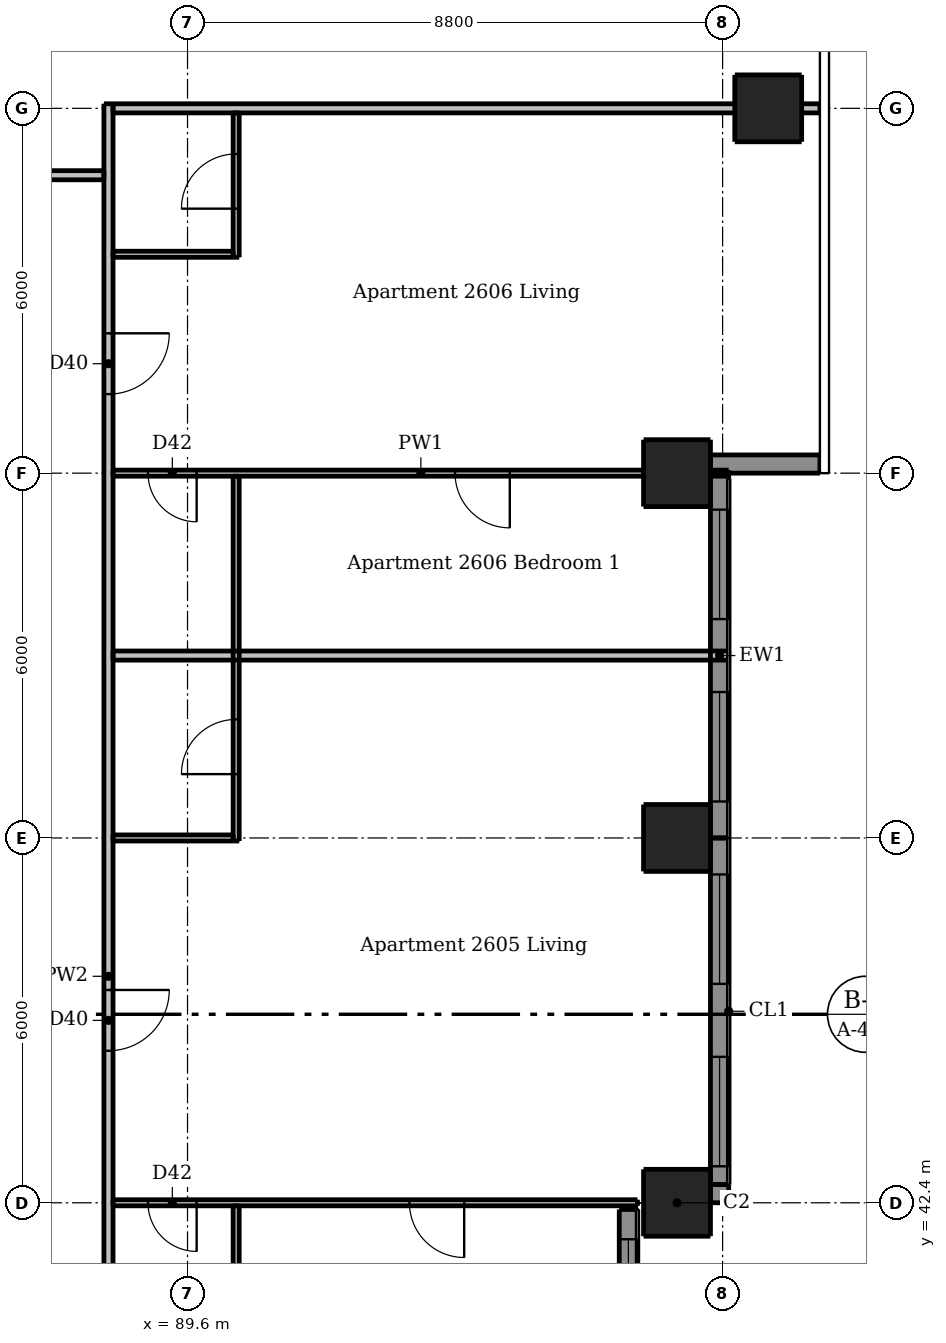
"""IFC4 building model, lengths in metres.
Left out: names, types, materials, properties, quantities, classifications, styles, units other than length and angle.
Written with IfcOpenShell. Run it as: python <this file> out.ifc"""

import sys

from ifc_helpers import new_model, si_unit, direction, frame, frame_2d, origin, origin_2d, place, context, subcontext, project, spatial, rectangle, extrude, element, fill, save


model = new_model("IFC4")
c1 = context("Model", 3, precision=1e-05, world=origin(), true_north=direction((0.0, 1.0)))
c2 = subcontext(c1, "Body", "Model", "MODEL_VIEW")
j1 = project(units=[si_unit("LENGTHUNIT", "METRE"), si_unit("PLANEANGLEUNIT", "RADIAN")], contexts=[c1])
p1 = place(None, origin())
s1 = spatial("IfcSite", under=j1, at=p1, CompositionType="ELEMENT")
p2 = place(p1, origin())
s2 = spatial("IfcBuilding", under=s1, at=p2, CompositionType="ELEMENT")
p3 = place(p2, frame((0.0, 0.0, 98.5)))
s3 = spatial("IfcBuildingStorey", under=s2, at=p3, CompositionType="ELEMENT", Elevation=98.5)
for number, where, z_axis, x_axis in (
    (1, (97.65, 42.4, 0.0), (0.0, 0.0, 1.0), (1.0, 0.0, 0.0)),
    (2, (97.65, 48.4, 0.0), (0.0, 0.0, 1.0), (1.0, 0.0, 0.0)),
    (3, (97.65, 54.4, 0.0), (0.0, 0.0, 1.0), (1.0, 0.0, 0.0)),
    (4, (99.15, 60.4, 0.0), (0.0, 0.0, 1.0), (1.0, 0.0, 0.0)),
):
    element("IfcColumn", number, at=place(p3, frame(where, z_axis=z_axis, x_axis=x_axis)), inside=s3, PredefinedType="COLUMN", context=c2, shape_type="SweptSolid", body=[
        extrude(rectangle(XDim=1.1, YDim=1.1, at=origin_2d()), origin(), (0.0, 0.0, 1.0), 3.05),
    ])
p4 = place(p3, frame((98.2, 42.55, 0.0), z_axis=(0.0, 0.0, 1.0), x_axis=(1.0, 0.0, 0.0)))
e5 = element("IfcWall", 5, at=p4, inside=s3, PredefinedType="SOLIDWALL", context=c2, shape_type="SweptSolid", body=[
    extrude(rectangle(XDim=0.3, YDim=0.3, at=frame_2d((0.15, 0.0))), origin(), (0.0, 0.0, 1.0), 3.05),
])
p5 = place(p3, frame((98.2, 54.55, 0.0), z_axis=(0.0, 0.0, 1.0), x_axis=(1.0, 0.0, 0.0)))
e6 = element("IfcWall", 6, at=p5, inside=s3, PredefinedType="SOLIDWALL", context=c2, shape_type="SweptSolid", body=[
    extrude(rectangle(XDim=1.8, YDim=0.3, at=frame_2d((0.9, 0.0))), origin(), (0.0, 0.0, 1.0), 3.05),
])
p6 = place(p3, frame((96.85, 36.7, 0.0), z_axis=(0.0, 0.0, 1.0), x_axis=(0.0, 1.0, 0.0)))
e7 = element("IfcWall", 7, at=p6, inside=s3, PredefinedType="SOLIDWALL", context=c2, shape_type="SweptSolid", body=[
    extrude(rectangle(XDim=5.59, YDim=0.3, at=frame_2d((2.795, 0.0))), origin(), (0.0, 0.0, 1.0), 3.05),
])
p7 = place(p6, frame((0.3, 0.0, 0.15)))
e8 = element("IfcOpeningElement", 8, at=p7, cuts=e7, PredefinedType="OPENING", context=c2, shape_type="SweptSolid", body=[
    extrude(rectangle(XDim=1.8, YDim=2.1, at=frame_2d((0.9, 1.05))), frame((0.0, 0.16, 0.0), z_axis=(0.0, -1.0, 0.0), x_axis=(1.0, 0.0, 0.0)), (0.0, 0.0, 1.0), 0.32),
])
p8 = place(p6, frame((3.3, 0.0, 0.15)))
e9 = element("IfcOpeningElement", 9, at=p8, cuts=e7, PredefinedType="OPENING", context=c2, shape_type="SweptSolid", body=[
    extrude(rectangle(XDim=1.8, YDim=2.1, at=frame_2d((0.9, 1.05))), frame((0.0, 0.16, 0.0), z_axis=(0.0, -1.0, 0.0), x_axis=(1.0, 0.0, 0.0)), (0.0, 0.0, 1.0), 0.32),
])
p9 = place(p3, frame((98.35, 42.7, 0.0), z_axis=(0.0, 0.0, 1.0), x_axis=(0.0, 1.0, 0.0)))
e10 = element("IfcWall", 10, at=p9, inside=s3, PredefinedType="SOLIDWALL", context=c2, shape_type="SweptSolid", body=[
    extrude(rectangle(XDim=5.7, YDim=0.3, at=frame_2d((2.85, 0.0))), origin(), (0.0, 0.0, 1.0), 3.05),
])
p10 = place(p9, frame((0.3, 0.0, 0.15)))
e11 = element("IfcOpeningElement", 11, at=p10, cuts=e10, PredefinedType="OPENING", context=c2, shape_type="SweptSolid", body=[
    extrude(rectangle(XDim=1.8, YDim=2.1, at=frame_2d((0.9, 1.05))), frame((0.0, 0.16, 0.0), z_axis=(0.0, -1.0, 0.0), x_axis=(1.0, 0.0, 0.0)), (0.0, 0.0, 1.0), 0.32),
])
p11 = place(p9, frame((3.3, 0.0, 0.15)))
e12 = element("IfcOpeningElement", 12, at=p11, cuts=e10, PredefinedType="OPENING", context=c2, shape_type="SweptSolid", body=[
    extrude(rectangle(XDim=1.8, YDim=2.1, at=frame_2d((0.9, 1.05))), frame((0.0, 0.16, 0.0), z_axis=(0.0, -1.0, 0.0), x_axis=(1.0, 0.0, 0.0)), (0.0, 0.0, 1.0), 0.32),
])
p12 = place(p3, frame((98.35, 48.4, 0.0), z_axis=(0.0, 0.0, 1.0), x_axis=(0.0, 1.0, 0.0)))
e13 = element("IfcWall", 13, at=p12, inside=s3, PredefinedType="SOLIDWALL", context=c2, shape_type="SweptSolid", body=[
    extrude(rectangle(XDim=6.0, YDim=0.3, at=frame_2d((3.0, 0.0))), origin(), (0.0, 0.0, 1.0), 3.05),
])
p13 = place(p12, frame((0.6, 0.0, 0.15)))
e14 = element("IfcOpeningElement", 14, at=p13, cuts=e13, PredefinedType="OPENING", context=c2, shape_type="SweptSolid", body=[
    extrude(rectangle(XDim=1.8, YDim=2.1, at=frame_2d((0.9, 1.05))), frame((0.0, 0.16, 0.0), z_axis=(0.0, -1.0, 0.0), x_axis=(1.0, 0.0, 0.0)), (0.0, 0.0, 1.0), 0.32),
])
p14 = place(p12, frame((3.6, 0.0, 0.15)))
e15 = element("IfcOpeningElement", 15, at=p14, cuts=e13, PredefinedType="OPENING", context=c2, shape_type="SweptSolid", body=[
    extrude(rectangle(XDim=1.8, YDim=2.1, at=frame_2d((0.9, 1.05))), frame((0.0, 0.16, 0.0), z_axis=(0.0, -1.0, 0.0), x_axis=(1.0, 0.0, 0.0)), (0.0, 0.0, 1.0), 0.32),
])
p15 = place(p3, frame((90.4, 33.45, 0.0), z_axis=(0.0, 0.0, 1.0), x_axis=(0.0, 1.0, 0.0)))
e16 = element("IfcWall", 16, at=p15, inside=s3, PredefinedType="PARTITIONING", context=c2, shape_type="SweptSolid", body=[
    extrude(rectangle(XDim=8.9, YDim=0.1, at=frame_2d((4.45, 0.0))), origin(), (0.0, 0.0, 1.0), 3.05),
])
p16 = place(p15, frame((3.75, 0.0, 0.0)))
e17 = element("IfcOpeningElement", 17, at=p16, cuts=e16, PredefinedType="OPENING", context=c2, shape_type="SweptSolid", body=[
    extrude(rectangle(XDim=0.8, YDim=2.1, at=frame_2d((0.4, 1.05))), frame((0.0, 0.06, 0.0), z_axis=(0.0, -1.0, 0.0), x_axis=(1.0, 0.0, 0.0)), (0.0, 0.0, 1.0), 0.12),
])
p17 = place(p3, frame((90.4, 48.35, 0.0), z_axis=(0.0, 0.0, 1.0), x_axis=(0.0, 1.0, 0.0)))
e18 = element("IfcWall", 18, at=p17, inside=s3, PredefinedType="PARTITIONING", context=c2, shape_type="SweptSolid", body=[
    extrude(rectangle(XDim=6.0, YDim=0.1, at=frame_2d((3.0, 0.0))), origin(), (0.0, 0.0, 1.0), 3.05),
])
p18 = place(p17, frame((1.1, 0.0, 0.0)))
e19 = element("IfcOpeningElement", 19, at=p18, cuts=e18, PredefinedType="OPENING", context=c2, shape_type="SweptSolid", body=[
    extrude(rectangle(XDim=0.9, YDim=2.1, at=frame_2d((0.45, 1.05))), frame((0.0, 0.06, 0.0), z_axis=(0.0, -1.0, 0.0), x_axis=(1.0, 0.0, 0.0)), (0.0, 0.0, 1.0), 0.12),
])
p19 = place(p3, frame((90.4, 57.95, 0.0), z_axis=(0.0, 0.0, 1.0), x_axis=(0.0, 1.0, 0.0)))
e20 = element("IfcWall", 20, at=p19, inside=s3, PredefinedType="PARTITIONING", context=c2, shape_type="SweptSolid", body=[
    extrude(rectangle(XDim=2.375, YDim=0.1, at=frame_2d((1.188, 0.0))), origin(), (0.0, 0.0, 1.0), 3.05),
])
p20 = place(p19, frame((0.8, 0.0, 0.0)))
e21 = element("IfcOpeningElement", 21, at=p20, cuts=e20, PredefinedType="OPENING", context=c2, shape_type="SweptSolid", body=[
    extrude(rectangle(XDim=0.9, YDim=2.1, at=frame_2d((0.45, 1.05))), frame((0.0, 0.06, 0.0), z_axis=(0.0, -1.0, 0.0), x_axis=(1.0, 0.0, 0.0)), (0.0, 0.0, 1.0), 0.12),
])
p21 = place(p3, frame((88.375, 58.0, 0.0), z_axis=(0.0, 0.0, 1.0), x_axis=(1.0, 0.0, 0.0)))
e22 = element("IfcWall", 22, at=p21, inside=s3, PredefinedType="PARTITIONING", context=c2, shape_type="SweptSolid", body=[
    extrude(rectangle(XDim=1.975, YDim=0.1, at=frame_2d((0.988, 0.0))), origin(), (0.0, 0.0, 1.0), 3.05),
])
p22 = place(p3, frame((98.5, 54.4, 0.0), z_axis=(0.0, 0.0, 1.0), x_axis=(-1.0, 0.0, 0.0)))
e23 = element("IfcWall", 23, at=p22, inside=s3, PredefinedType="PARTITIONING", context=c2, shape_type="SweptSolid", body=[
    extrude(rectangle(XDim=10.125, YDim=0.1, at=frame_2d((5.062, 0.0))), origin(), (0.0, 0.0, 1.0), 2.516),
])
p23 = place(p22, frame((3.6, 0.0, 0.0)))
e24 = element("IfcOpeningElement", 24, at=p23, cuts=e23, PredefinedType="OPENING", context=c2, shape_type="SweptSolid", body=[
    extrude(rectangle(XDim=0.9, YDim=2.1, at=frame_2d((0.45, 1.05))), frame((0.0, 0.06, 0.0), z_axis=(0.0, -1.0, 0.0), x_axis=(1.0, 0.0, 0.0)), (0.0, 0.0, 1.0), 0.12),
])
p24 = place(p22, frame((8.75, 0.0, 0.0)))
e25 = element("IfcOpeningElement", 25, at=p24, cuts=e23, PredefinedType="OPENING", context=c2, shape_type="SweptSolid", body=[
    extrude(rectangle(XDim=0.8, YDim=2.1, at=frame_2d((0.4, 1.05))), frame((0.0, 0.06, 0.0), z_axis=(0.0, -1.0, 0.0), x_axis=(1.0, 0.0, 0.0)), (0.0, 0.0, 1.0), 0.12),
])
p25 = place(p3, frame((88.375, 48.4, 0.0), z_axis=(0.0, 0.0, 1.0), x_axis=(1.0, 0.0, 0.0)))
e26 = element("IfcWall", 26, at=p25, inside=s3, PredefinedType="PARTITIONING", context=c2, shape_type="SweptSolid", body=[
    extrude(rectangle(XDim=1.975, YDim=0.1, at=frame_2d((0.988, 0.0))), origin(), (0.0, 0.0, 1.0), 2.516),
])
p26 = place(p3, frame((97.0, 42.4, 0.0), z_axis=(0.0, 0.0, 1.0), x_axis=(-1.0, 0.0, 0.0)))
e27 = element("IfcWall", 27, at=p26, inside=s3, PredefinedType="PARTITIONING", context=c2, shape_type="SweptSolid", body=[
    extrude(rectangle(XDim=8.625, YDim=0.1, at=frame_2d((4.312, 0.0))), origin(), (0.0, 0.0, 1.0), 2.516),
])
p27 = place(p26, frame((2.85, 0.0, 0.0)))
e28 = element("IfcOpeningElement", 28, at=p27, cuts=e27, PredefinedType="OPENING", context=c2, shape_type="SweptSolid", body=[
    extrude(rectangle(XDim=0.9, YDim=2.1, at=frame_2d((0.45, 1.05))), frame((0.0, 0.06, 0.0), z_axis=(0.0, -1.0, 0.0), x_axis=(1.0, 0.0, 0.0)), (0.0, 0.0, 1.0), 0.12),
])
p28 = place(p26, frame((7.25, 0.0, 0.0)))
e29 = element("IfcOpeningElement", 29, at=p28, cuts=e27, PredefinedType="OPENING", context=c2, shape_type="SweptSolid", body=[
    extrude(rectangle(XDim=0.8, YDim=2.1, at=frame_2d((0.4, 1.05))), frame((0.0, 0.06, 0.0), z_axis=(0.0, -1.0, 0.0), x_axis=(1.0, 0.0, 0.0)), (0.0, 0.0, 1.0), 0.12),
])
p29 = place(p3, frame((88.3, 60.475, 0.0), z_axis=(0.0, 0.0, 1.0), x_axis=(0.0, -1.0, 0.0)))
e30 = element("IfcWall", 30, at=p29, inside=s3, PredefinedType="PARTITIONING", context=c2, shape_type="SweptSolid", body=[
    extrude(rectangle(XDim=28.7, YDim=0.15, at=frame_2d((14.35, 0.0))), origin(), (0.0, 0.0, 1.0), 3.05),
])
p30 = place(p29, frame((27.425, 0.0, 0.0)))
e31 = element("IfcOpeningElement", 31, at=p30, cuts=e30, PredefinedType="OPENING", context=c2, shape_type="SweptSolid", body=[
    extrude(rectangle(XDim=1.0, YDim=2.1, at=frame_2d((0.5, 1.05))), frame((0.0, 0.085, 0.0), z_axis=(0.0, -1.0, 0.0), x_axis=(1.0, 0.0, 0.0)), (0.0, 0.0, 1.0), 0.17),
])
p31 = place(p29, frame((14.575, 0.0, 0.0)))
e32 = element("IfcOpeningElement", 32, at=p31, cuts=e30, PredefinedType="OPENING", context=c2, shape_type="SweptSolid", body=[
    extrude(rectangle(XDim=1.0, YDim=2.1, at=frame_2d((0.5, 1.05))), frame((0.0, 0.085, 0.0), z_axis=(0.0, -1.0, 0.0), x_axis=(1.0, 0.0, 0.0)), (0.0, 0.0, 1.0), 0.17),
])
p32 = place(p29, frame((3.775, 0.0, 0.0)))
e33 = element("IfcOpeningElement", 33, at=p32, cuts=e30, PredefinedType="OPENING", context=c2, shape_type="SweptSolid", body=[
    extrude(rectangle(XDim=1.0, YDim=2.1, at=frame_2d((0.5, 1.05))), frame((0.0, 0.085, 0.0), z_axis=(0.0, -1.0, 0.0), x_axis=(1.0, 0.0, 0.0)), (0.0, 0.0, 1.0), 0.17),
])
p33 = place(p3, frame((88.375, 60.4, 0.0), z_axis=(0.0, 0.0, 1.0), x_axis=(1.0, 0.0, 0.0)))
e34 = element("IfcWall", 34, at=p33, inside=s3, PredefinedType="PARTITIONING", context=c2, shape_type="SweptSolid", body=[
    extrude(rectangle(XDim=11.625, YDim=0.15, at=frame_2d((5.812, 0.0))), origin(), (0.0, 0.0, 1.0), 2.516),
])
p34 = place(p3, frame((59.675, 59.3, 0.0), z_axis=(0.0, 0.0, 1.0), x_axis=(1.0, 0.0, 0.0)))
e35 = element("IfcWall", 35, at=p34, inside=s3, PredefinedType="PARTITIONING", context=c2, shape_type="SweptSolid", body=[
    extrude(rectangle(XDim=28.55, YDim=0.15, at=frame_2d((14.275, 0.0))), origin(), (0.0, 0.0, 1.0), 3.05),
])
p35 = place(p34, frame((3.625, 0.0, 0.0)))
e36 = element("IfcOpeningElement", 36, at=p35, cuts=e35, PredefinedType="OPENING", context=c2, shape_type="SweptSolid", body=[
    extrude(rectangle(XDim=1.0, YDim=2.1, at=frame_2d((0.5, 1.05))), frame((0.0, 0.085, 0.0), z_axis=(0.0, -1.0, 0.0), x_axis=(1.0, 0.0, 0.0)), (0.0, 0.0, 1.0), 0.17),
])
p36 = place(p34, frame((14.425, 0.0, 0.0)))
e37 = element("IfcOpeningElement", 37, at=p36, cuts=e35, PredefinedType="OPENING", context=c2, shape_type="SweptSolid", body=[
    extrude(rectangle(XDim=1.0, YDim=2.1, at=frame_2d((0.5, 1.05))), frame((0.0, 0.085, 0.0), z_axis=(0.0, -1.0, 0.0), x_axis=(1.0, 0.0, 0.0)), (0.0, 0.0, 1.0), 0.17),
])
p37 = place(p34, frame((25.775, 0.0, 0.0)))
e38 = element("IfcOpeningElement", 38, at=p37, cuts=e35, PredefinedType="OPENING", context=c2, shape_type="SweptSolid", body=[
    extrude(rectangle(XDim=1.0, YDim=2.1, at=frame_2d((0.5, 1.05))), frame((0.0, 0.085, 0.0), z_axis=(0.0, -1.0, 0.0), x_axis=(1.0, 0.0, 0.0)), (0.0, 0.0, 1.0), 0.17),
])
p38 = place(p3, frame((88.375, 51.4, 0.0), z_axis=(0.0, 0.0, 1.0), x_axis=(1.0, 0.0, 0.0)))
e39 = element("IfcWall", 39, at=p38, inside=s3, PredefinedType="PARTITIONING", context=c2, shape_type="SweptSolid", body=[
    extrude(rectangle(XDim=10.125, YDim=0.15, at=frame_2d((5.062, 0.0))), origin(), (0.0, 0.0, 1.0), 3.05),
])
p39 = place(p8, origin())
e40 = element("IfcWindow", 40, at=p39, inside=s3, PartitioningType="DOUBLE_PANEL_VERTICAL", PredefinedType="WINDOW", context=c2, shape_type="SweptSolid", body=[
    extrude(rectangle(XDim=1.8, YDim=2.1, at=frame_2d((0.9, 1.05))), frame((0.0, 0.03, 0.0), z_axis=(0.0, -1.0, 0.0), x_axis=(1.0, 0.0, 0.0)), (0.0, 0.0, 1.0), 0.06),
])
fill(e9, e40)
p40 = place(p10, origin())
e41 = element("IfcWindow", 41, at=p40, inside=s3, PartitioningType="DOUBLE_PANEL_VERTICAL", PredefinedType="WINDOW", context=c2, shape_type="SweptSolid", body=[
    extrude(rectangle(XDim=1.8, YDim=2.1, at=frame_2d((0.9, 1.05))), frame((0.0, 0.03, 0.0), z_axis=(0.0, -1.0, 0.0), x_axis=(1.0, 0.0, 0.0)), (0.0, 0.0, 1.0), 0.06),
])
fill(e11, e41)
p41 = place(p11, origin())
e42 = element("IfcWindow", 42, at=p41, inside=s3, PartitioningType="DOUBLE_PANEL_VERTICAL", PredefinedType="WINDOW", context=c2, shape_type="SweptSolid", body=[
    extrude(rectangle(XDim=1.8, YDim=2.1, at=frame_2d((0.9, 1.05))), frame((0.0, 0.03, 0.0), z_axis=(0.0, -1.0, 0.0), x_axis=(1.0, 0.0, 0.0)), (0.0, 0.0, 1.0), 0.06),
])
fill(e12, e42)
p42 = place(p13, origin())
e43 = element("IfcWindow", 43, at=p42, inside=s3, PartitioningType="DOUBLE_PANEL_VERTICAL", PredefinedType="WINDOW", context=c2, shape_type="SweptSolid", body=[
    extrude(rectangle(XDim=1.8, YDim=2.1, at=frame_2d((0.9, 1.05))), frame((0.0, 0.03, 0.0), z_axis=(0.0, -1.0, 0.0), x_axis=(1.0, 0.0, 0.0)), (0.0, 0.0, 1.0), 0.06),
])
fill(e14, e43)
p43 = place(p14, origin())
e44 = element("IfcWindow", 44, at=p43, inside=s3, PartitioningType="DOUBLE_PANEL_VERTICAL", PredefinedType="WINDOW", context=c2, shape_type="SweptSolid", body=[
    extrude(rectangle(XDim=1.8, YDim=2.1, at=frame_2d((0.9, 1.05))), frame((0.0, 0.03, 0.0), z_axis=(0.0, -1.0, 0.0), x_axis=(1.0, 0.0, 0.0)), (0.0, 0.0, 1.0), 0.06),
])
fill(e15, e44)
p44 = place(p31, origin())
e45 = element("IfcDoor", 45, at=p44, inside=s3, OperationType="SINGLE_SWING_LEFT", PredefinedType="DOOR", context=c2, shape_type="SweptSolid", body=[
    extrude(rectangle(XDim=1.0, YDim=2.1, at=frame_2d((0.5, 1.05))), frame((0.0, 0.025, 0.0), z_axis=(0.0, -1.0, 0.0), x_axis=(1.0, 0.0, 0.0)), (0.0, 0.0, 1.0), 0.05),
])
fill(e32, e45)
p45 = place(p18, origin())
e46 = element("IfcDoor", 46, at=p45, inside=s3, OperationType="SINGLE_SWING_LEFT", PredefinedType="DOOR", context=c2, shape_type="SweptSolid", body=[
    extrude(rectangle(XDim=0.9, YDim=2.1, at=frame_2d((0.45, 1.05))), frame((0.0, 0.025, 0.0), z_axis=(0.0, -1.0, 0.0), x_axis=(1.0, 0.0, 0.0)), (0.0, 0.0, 1.0), 0.05),
])
fill(e19, e46)
p46 = place(p27, origin())
e47 = element("IfcDoor", 47, at=p46, inside=s3, OperationType="SINGLE_SWING_LEFT", PredefinedType="DOOR", context=c2, shape_type="SweptSolid", body=[
    extrude(rectangle(XDim=0.9, YDim=2.1, at=frame_2d((0.45, 1.05))), frame((0.0, 0.025, 0.0), z_axis=(0.0, -1.0, 0.0), x_axis=(1.0, 0.0, 0.0)), (0.0, 0.0, 1.0), 0.05),
])
fill(e28, e47)
p47 = place(p28, origin())
e48 = element("IfcDoor", 48, at=p47, inside=s3, OperationType="SINGLE_SWING_LEFT", PredefinedType="DOOR", context=c2, shape_type="SweptSolid", body=[
    extrude(rectangle(XDim=0.8, YDim=2.1, at=frame_2d((0.4, 1.05))), frame((0.0, 0.025, 0.0), z_axis=(0.0, -1.0, 0.0), x_axis=(1.0, 0.0, 0.0)), (0.0, 0.0, 1.0), 0.05),
])
fill(e29, e48)
p48 = place(p32, origin())
e49 = element("IfcDoor", 49, at=p48, inside=s3, OperationType="SINGLE_SWING_LEFT", PredefinedType="DOOR", context=c2, shape_type="SweptSolid", body=[
    extrude(rectangle(XDim=1.0, YDim=2.1, at=frame_2d((0.5, 1.05))), frame((0.0, 0.025, 0.0), z_axis=(0.0, -1.0, 0.0), x_axis=(1.0, 0.0, 0.0)), (0.0, 0.0, 1.0), 0.05),
])
fill(e33, e49)
p49 = place(p20, origin())
e50 = element("IfcDoor", 50, at=p49, inside=s3, OperationType="SINGLE_SWING_LEFT", PredefinedType="DOOR", context=c2, shape_type="SweptSolid", body=[
    extrude(rectangle(XDim=0.9, YDim=2.1, at=frame_2d((0.45, 1.05))), frame((0.0, 0.025, 0.0), z_axis=(0.0, -1.0, 0.0), x_axis=(1.0, 0.0, 0.0)), (0.0, 0.0, 1.0), 0.05),
])
fill(e21, e50)
p50 = place(p23, origin())
e51 = element("IfcDoor", 51, at=p50, inside=s3, OperationType="SINGLE_SWING_LEFT", PredefinedType="DOOR", context=c2, shape_type="SweptSolid", body=[
    extrude(rectangle(XDim=0.9, YDim=2.1, at=frame_2d((0.45, 1.05))), frame((0.0, 0.025, 0.0), z_axis=(0.0, -1.0, 0.0), x_axis=(1.0, 0.0, 0.0)), (0.0, 0.0, 1.0), 0.05),
])
fill(e24, e51)
p51 = place(p24, origin())
e52 = element("IfcDoor", 52, at=p51, inside=s3, OperationType="SINGLE_SWING_LEFT", PredefinedType="DOOR", context=c2, shape_type="SweptSolid", body=[
    extrude(rectangle(XDim=0.8, YDim=2.1, at=frame_2d((0.4, 1.05))), frame((0.0, 0.025, 0.0), z_axis=(0.0, -1.0, 0.0), x_axis=(1.0, 0.0, 0.0)), (0.0, 0.0, 1.0), 0.05),
])
fill(e25, e52)
save(model, sys.argv[1])
